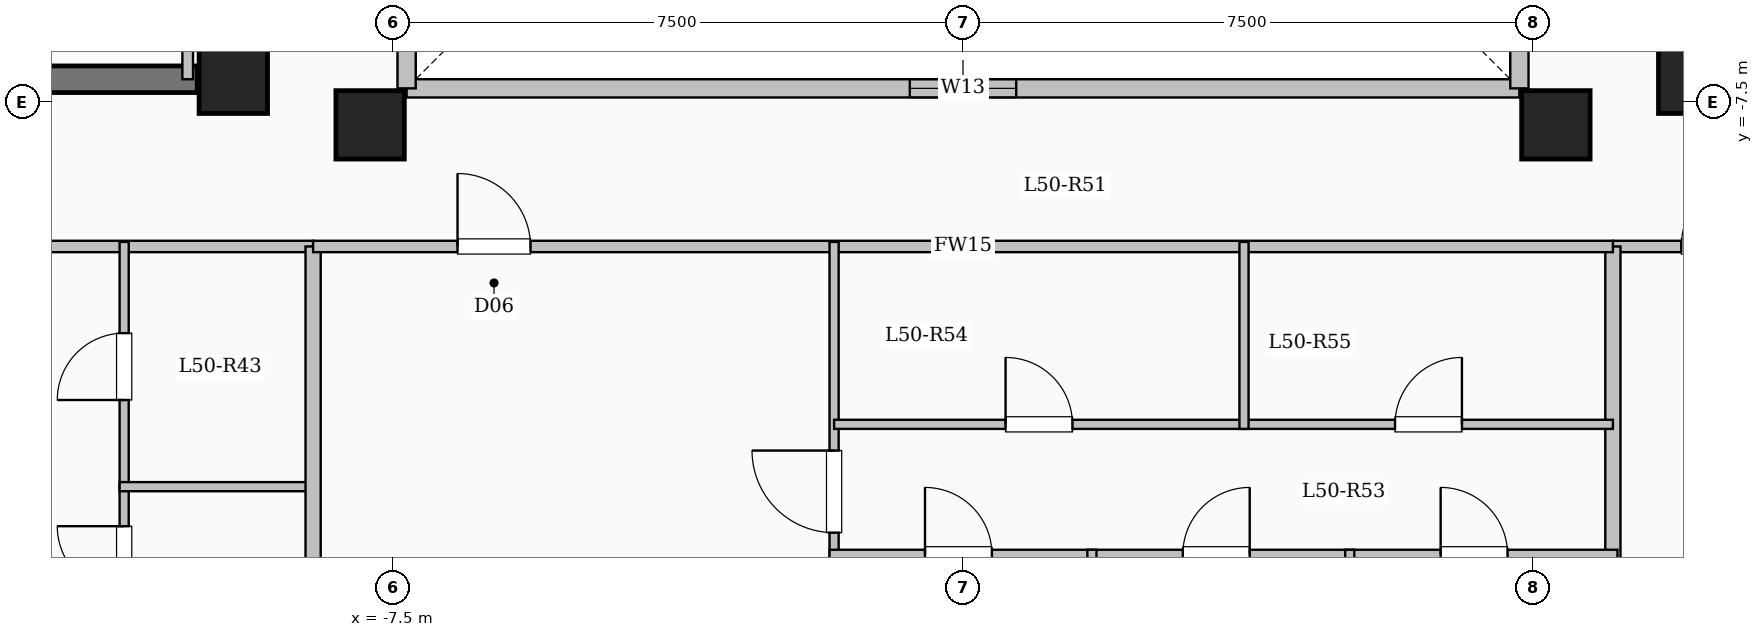
"""IFC4 building model, lengths in metres.
Left out: names, types, materials, properties, quantities, classifications, styles, units other than length and angle.
Written with IfcOpenShell. Run it as: python <this file> out.ifc"""

import sys

from ifc_helpers import new_model, si_unit, direction, frame, frame_2d, origin, origin_2d, place, context, subcontext, project, spatial, rectangle, extrude, element, fill, save


model = new_model("IFC4")
c1 = context("Model", 3, precision=1e-05, world=origin(), true_north=direction((0.0, 1.0)))
c2 = subcontext(c1, "Body", "Model", "MODEL_VIEW")
j1 = project(units=[si_unit("LENGTHUNIT", "METRE"), si_unit("PLANEANGLEUNIT", "RADIAN")], contexts=[c1])
p1 = place(None, origin())
s1 = spatial("IfcSite", under=j1, at=p1, CompositionType="ELEMENT")
p2 = place(p1, origin())
s2 = spatial("IfcBuilding", under=s1, at=p2, CompositionType="ELEMENT")
p3 = place(p2, frame((0.0, 0.0, 186.9)))
s3 = spatial("IfcBuildingStorey", under=s2, at=p3, CompositionType="ELEMENT", Elevation=186.9)
for number, where, z_axis, x_axis in (
    (1, (-7.8, -7.8, 0.0), (0.0, 0.0, 1.0), (1.0, 0.0, 0.0)),
    (2, (7.8, -7.8, 0.0), (0.0, 0.0, 1.0), (1.0, 0.0, 0.0)),
    (3, (-9.6, -7.2, 0.0), (0.0, 0.0, 1.0), (1.0, 0.0, 0.0)),
    (4, (9.6, -7.2, 0.0), (0.0, 0.0, 1.0), (1.0, 0.0, 0.0)),
):
    element("IfcColumn", number, at=place(p3, frame(where, z_axis=z_axis, x_axis=x_axis)), inside=s3, PredefinedType="COLUMN", context=c2, shape_type="SweptSolid", body=[
        extrude(rectangle(XDim=0.9, YDim=0.9, at=origin_2d()), origin(), (0.0, 0.0, 1.0), 3.35),
    ])
p4 = place(p3, frame((-7.32, -7.32, 0.0), z_axis=(0.0, 0.0, 1.0), x_axis=(1.0, 0.0, 0.0)))
e5 = element("IfcWall", 5, at=p4, inside=s3, PredefinedType="SOLIDWALL", context=c2, shape_type="SweptSolid", body=[
    extrude(rectangle(XDim=14.64, YDim=0.24, at=frame_2d((7.32, 0.0))), origin(), (0.0, 0.0, 1.0), 3.1),
])
p5 = place(p4, frame((6.62, 0.0, 0.95)))
e6 = element("IfcOpeningElement", 6, at=p5, cuts=e5, PredefinedType="OPENING", context=c2, shape_type="SweptSolid", body=[
    extrude(rectangle(XDim=1.4, YDim=1.5, at=frame_2d((0.7, 0.75))), frame((0.0, 0.13, 0.0), z_axis=(0.0, -1.0, 0.0), x_axis=(1.0, 0.0, 0.0)), (0.0, 0.0, 1.0), 0.26),
])
p6 = place(p3, frame((7.32, -7.32, 0.0), z_axis=(0.0, 0.0, 1.0), x_axis=(0.0, 1.0, 0.0)))
e7 = element("IfcWall", 7, at=p6, inside=s3, PredefinedType="SOLIDWALL", context=c2, shape_type="SweptSolid", body=[
    extrude(rectangle(XDim=14.64, YDim=0.24, at=frame_2d((7.32, 0.0))), origin(), (0.0, 0.0, 1.0), 3.1),
])
p7 = place(p6, frame((6.62, 0.0, 0.95)))
e8 = element("IfcOpeningElement", 8, at=p7, cuts=e7, PredefinedType="OPENING", context=c2, shape_type="SweptSolid", body=[
    extrude(rectangle(XDim=1.4, YDim=1.5, at=frame_2d((0.7, 0.75))), frame((0.0, 0.13, 0.0), z_axis=(0.0, -1.0, 0.0), x_axis=(1.0, 0.0, 0.0)), (0.0, 0.0, 1.0), 0.26),
])
p8 = place(p3, frame((-7.32, 7.32, 0.0), z_axis=(0.0, 0.0, 1.0), x_axis=(0.0, -1.0, 0.0)))
e9 = element("IfcWall", 9, at=p8, inside=s3, PredefinedType="SOLIDWALL", context=c2, shape_type="SweptSolid", body=[
    extrude(rectangle(XDim=14.64, YDim=0.24, at=frame_2d((7.32, 0.0))), origin(), (0.0, 0.0, 1.0), 3.1),
])
p9 = place(p8, frame((6.62, 0.0, 0.95)))
e10 = element("IfcOpeningElement", 10, at=p9, cuts=e9, PredefinedType="OPENING", context=c2, shape_type="SweptSolid", body=[
    extrude(rectangle(XDim=1.4, YDim=1.5, at=frame_2d((0.7, 0.75))), frame((0.0, 0.13, 0.0), z_axis=(0.0, -1.0, 0.0), x_axis=(1.0, 0.0, 0.0)), (0.0, 0.0, 1.0), 0.26),
])
p10 = place(p3, frame((-18.625, -7.2, 0.0), z_axis=(0.0, 0.0, 1.0), x_axis=(1.0, 0.0, 0.0)))
e11 = element("IfcWall", 11, at=p10, inside=s3, PredefinedType="SHEAR", context=c2, shape_type="SweptSolid", body=[
    extrude(rectangle(XDim=8.55, YDim=0.35, at=frame_2d((4.275, 0.0))), origin(), (0.0, 0.0, 1.0), 3.35),
])
p11 = place(p10, frame((1.725, 0.0, 0.0)))
e12 = element("IfcOpeningElement", 12, at=p11, cuts=e11, PredefinedType="OPENING", context=c2, shape_type="SweptSolid", body=[
    extrude(rectangle(XDim=1.12, YDim=2.15, at=frame_2d((0.56, 1.075))), frame((0.0, 0.185, 0.0), z_axis=(0.0, -1.0, 0.0), x_axis=(1.0, 0.0, 0.0)), (0.0, 0.0, 1.0), 0.37),
])
p12 = place(p3, frame((-10.2, -7.2, 0.0), z_axis=(0.0, 0.0, 1.0), x_axis=(0.0, 1.0, 0.0)))
e13 = element("IfcWall", 13, at=p12, inside=s3, PredefinedType="PARTITIONING", context=c2, shape_type="SweptSolid", body=[
    extrude(rectangle(XDim=9.12, YDim=0.14, at=frame_2d((4.56, 0.0))), origin(), (0.0, 0.0, 1.0), 3.1),
])
p13 = place(p12, frame((1.75, 0.0, 0.0)))
e14 = element("IfcOpeningElement", 14, at=p13, cuts=e13, PredefinedType="OPENING", context=c2, shape_type="SweptSolid", body=[
    extrude(rectangle(XDim=0.95, YDim=2.12, at=frame_2d((0.475, 1.06))), frame((0.0, 0.08, 0.0), z_axis=(0.0, -1.0, 0.0), x_axis=(1.0, 0.0, 0.0)), (0.0, 0.0, 1.0), 0.16),
])
p14 = place(p12, frame((5.8, 0.0, 0.0)))
e15 = element("IfcOpeningElement", 15, at=p14, cuts=e13, PredefinedType="OPENING", context=c2, shape_type="SweptSolid", body=[
    extrude(rectangle(XDim=0.95, YDim=2.12, at=frame_2d((0.475, 1.06))), frame((0.0, 0.08, 0.0), z_axis=(0.0, -1.0, 0.0), x_axis=(1.0, 0.0, 0.0)), (0.0, 0.0, 1.0), 0.16),
])
p15 = place(p3, frame((-18.35, -9.4, 0.0), z_axis=(0.0, 0.0, 1.0), x_axis=(1.0, 0.0, 0.0)))
e16 = element("IfcWall", 16, at=p15, inside=s3, PredefinedType="PARTITIONING", context=c2, shape_type="SweptSolid", body=[
    extrude(rectangle(XDim=9.8, YDim=0.15, at=frame_2d((4.9, 0.0))), origin(), (0.0, 0.0, 1.0), 3.1),
])
p16 = place(p15, frame((0.7, 0.0, 0.0)))
e17 = element("IfcOpeningElement", 17, at=p16, cuts=e16, PredefinedType="OPENING", context=c2, shape_type="SweptSolid", body=[
    extrude(rectangle(XDim=0.96, YDim=2.15, at=frame_2d((0.48, 1.075))), frame((0.0, 0.085, 0.0), z_axis=(0.0, -1.0, 0.0), x_axis=(1.0, 0.0, 0.0)), (0.0, 0.0, 1.0), 0.17),
])
p17 = place(p15, frame((5.38, 0.0, 0.0)))
e18 = element("IfcOpeningElement", 18, at=p17, cuts=e16, PredefinedType="OPENING", context=c2, shape_type="SweptSolid", body=[
    extrude(rectangle(XDim=0.96, YDim=2.15, at=frame_2d((0.48, 1.075))), frame((0.0, 0.085, 0.0), z_axis=(0.0, -1.0, 0.0), x_axis=(1.0, 0.0, 0.0)), (0.0, 0.0, 1.0), 0.17),
])
p18 = place(p3, frame((8.55, -9.4, 0.0), z_axis=(0.0, 0.0, 1.0), x_axis=(1.0, 0.0, 0.0)))
e19 = element("IfcWall", 19, at=p18, inside=s3, PredefinedType="PARTITIONING", context=c2, shape_type="SweptSolid", body=[
    extrude(rectangle(XDim=9.8, YDim=0.15, at=frame_2d((4.9, 0.0))), origin(), (0.0, 0.0, 1.0), 3.1),
])
p19 = place(p18, frame((0.9, 0.0, 0.0)))
e20 = element("IfcOpeningElement", 20, at=p19, cuts=e19, PredefinedType="OPENING", context=c2, shape_type="SweptSolid", body=[
    extrude(rectangle(XDim=0.96, YDim=2.15, at=frame_2d((0.48, 1.075))), frame((0.0, 0.085, 0.0), z_axis=(0.0, -1.0, 0.0), x_axis=(1.0, 0.0, 0.0)), (0.0, 0.0, 1.0), 0.17),
])
p20 = place(p3, frame((-11.036, -20.9, 0.0), z_axis=(0.0, 0.0, 1.0), x_axis=(0.0, 1.0, 0.0)))
e21 = element("IfcWall", 21, at=p20, inside=s3, PredefinedType="PARTITIONING", context=c2, shape_type="SweptSolid", body=[
    extrude(rectangle(XDim=8.34, YDim=0.12, at=frame_2d((4.17, 0.0))), origin(), (0.0, 0.0, 1.0), 3.1),
])
p21 = place(p20, frame((6.94, 0.0, 0.0)))
e22 = element("IfcOpeningElement", 22, at=p21, cuts=e21, PredefinedType="OPENING", context=c2, shape_type="SweptSolid", body=[
    extrude(rectangle(XDim=0.88, YDim=2.1, at=frame_2d((0.44, 1.05))), frame((0.0, 0.07, 0.0), z_axis=(0.0, -1.0, 0.0), x_axis=(1.0, 0.0, 0.0)), (0.0, 0.0, 1.0), 0.14),
])
p22 = place(p3, frame((-11.036, -12.56, 0.0), z_axis=(0.0, 0.0, 1.0), x_axis=(0.0, 1.0, 0.0)))
e23 = element("IfcWall", 23, at=p22, inside=s3, PredefinedType="PARTITIONING", context=c2, shape_type="SweptSolid", body=[
    extrude(rectangle(XDim=3.22, YDim=0.12, at=frame_2d((1.61, 0.0))), origin(), (0.0, 0.0, 1.0), 3.1),
])
p23 = place(p22, frame((1.14, 0.0, 0.0)))
e24 = element("IfcOpeningElement", 24, at=p23, cuts=e23, PredefinedType="OPENING", context=c2, shape_type="SweptSolid", body=[
    extrude(rectangle(XDim=0.88, YDim=2.1, at=frame_2d((0.44, 1.05))), frame((0.0, 0.07, 0.0), z_axis=(0.0, -1.0, 0.0), x_axis=(1.0, 0.0, 0.0)), (0.0, 0.0, 1.0), 0.14),
])
p24 = place(p3, frame((-11.096, -12.56, 0.0), z_axis=(0.0, 0.0, 1.0), x_axis=(1.0, 0.0, 0.0)))
e25 = element("IfcWall", 25, at=p24, inside=s3, PredefinedType="PARTITIONING", context=c2, shape_type="SweptSolid", body=[
    extrude(rectangle(XDim=2.556, YDim=0.12, at=frame_2d((1.278, 0.0))), origin(), (0.0, 0.0, 1.0), 2.725),
])
for number, where, z_axis, x_axis in (
    (26, (-8.55, -21.504, 0.0), (0.0, 0.0, 1.0), (0.0, 1.0, 0.0)),
    (27, (8.55, -21.504, 0.0), (0.0, 0.0, 1.0), (0.0, 1.0, 0.0)),
):
    element("IfcWall", number, at=place(p3, frame(where, z_axis=z_axis, x_axis=x_axis)), inside=s3, PredefinedType="SOLIDWALL", context=c2, shape_type="SweptSolid", body=[
        extrude(rectangle(XDim=12.104, YDim=0.2, at=frame_2d((6.052, 0.0))), origin(), (0.0, 0.0, 1.0), 3.1),
    ])
p25 = place(p3, frame((-8.55, -9.4, 0.0), z_axis=(0.0, 0.0, 1.0), x_axis=(1.0, 0.0, 0.0)))
e28 = element("IfcWall", 28, at=p25, inside=s3, PredefinedType="PARTITIONING", context=c2, shape_type="SweptSolid", body=[
    extrude(rectangle(XDim=17.1, YDim=0.15, at=frame_2d((8.55, 0.0))), origin(), (0.0, 0.0, 1.0), 3.1),
])
p26 = place(p25, frame((1.9, 0.0, 0.0)))
e29 = element("IfcOpeningElement", 29, at=p26, cuts=e28, PredefinedType="OPENING", context=c2, shape_type="SweptSolid", body=[
    extrude(rectangle(XDim=0.96, YDim=2.15, at=frame_2d((0.48, 1.075))), frame((0.0, 0.085, 0.0), z_axis=(0.0, -1.0, 0.0), x_axis=(1.0, 0.0, 0.0)), (0.0, 0.0, 1.0), 0.17),
])
p27 = place(p3, frame((-1.696, -22.38, 0.0), z_axis=(0.0, 0.0, 1.0), x_axis=(0.0, 1.0, 0.0)))
e30 = element("IfcWall", 30, at=p27, inside=s3, PredefinedType="PARTITIONING", context=c2, shape_type="SweptSolid", body=[
    extrude(rectangle(XDim=13.04, YDim=0.12, at=frame_2d((6.52, 0.0))), origin(), (0.0, 0.0, 1.0), 3.1),
])
p28 = place(p27, frame((9.215, 0.0, 0.0)))
e31 = element("IfcOpeningElement", 31, at=p28, cuts=e30, PredefinedType="OPENING", context=c2, shape_type="SweptSolid", body=[
    extrude(rectangle(XDim=1.08, YDim=2.15, at=frame_2d((0.54, 1.075))), frame((0.0, 0.07, 0.0), z_axis=(0.0, -1.0, 0.0), x_axis=(1.0, 0.0, 0.0)), (0.0, 0.0, 1.0), 0.14),
])
p29 = place(p3, frame((-1.696, -11.74, 0.0), z_axis=(0.0, 0.0, 1.0), x_axis=(1.0, 0.0, 0.0)))
e32 = element("IfcWall", 32, at=p29, inside=s3, PredefinedType="PARTITIONING", context=c2, shape_type="SweptSolid", body=[
    extrude(rectangle(XDim=5.393, YDim=0.12, at=frame_2d((2.697, 0.0))), origin(), (0.0, 0.0, 1.0), 3.1),
])
p30 = place(p29, frame((2.256, 0.0, 0.0)))
e33 = element("IfcOpeningElement", 33, at=p30, cuts=e32, PredefinedType="OPENING", context=c2, shape_type="SweptSolid", body=[
    extrude(rectangle(XDim=0.88, YDim=2.1, at=frame_2d((0.44, 1.05))), frame((0.0, 0.07, 0.0), z_axis=(0.0, -1.0, 0.0), x_axis=(1.0, 0.0, 0.0)), (0.0, 0.0, 1.0), 0.14),
])
p31 = place(p3, frame((3.697, -11.74, 0.0), z_axis=(0.0, 0.0, 1.0), x_axis=(1.0, 0.0, 0.0)))
e34 = element("IfcWall", 34, at=p31, inside=s3, PredefinedType="PARTITIONING", context=c2, shape_type="SweptSolid", body=[
    extrude(rectangle(XDim=4.853, YDim=0.12, at=frame_2d((2.427, 0.0))), origin(), (0.0, 0.0, 1.0), 3.1),
])
p32 = place(p31, frame((1.987, 0.0, 0.0)))
e35 = element("IfcOpeningElement", 35, at=p32, cuts=e34, PredefinedType="OPENING", context=c2, shape_type="SweptSolid", body=[
    extrude(rectangle(XDim=0.88, YDim=2.1, at=frame_2d((0.44, 1.05))), frame((0.0, 0.07, 0.0), z_axis=(0.0, -1.0, 0.0), x_axis=(1.0, 0.0, 0.0)), (0.0, 0.0, 1.0), 0.14),
])
p33 = place(p3, frame((-1.756, -13.45, 0.0), z_axis=(0.0, 0.0, 1.0), x_axis=(1.0, 0.0, 0.0)))
e36 = element("IfcWall", 36, at=p33, inside=s3, PredefinedType="PARTITIONING", context=c2, shape_type="SweptSolid", body=[
    extrude(rectangle(XDim=10.366, YDim=0.12, at=frame_2d((5.183, 0.0))), origin(), (0.0, 0.0, 1.0), 3.1),
])
p34 = place(p33, frame((1.256, 0.0, 0.0)))
e37 = element("IfcOpeningElement", 37, at=p34, cuts=e36, PredefinedType="OPENING", context=c2, shape_type="SweptSolid", body=[
    extrude(rectangle(XDim=0.88, YDim=2.1, at=frame_2d((0.44, 1.05))), frame((0.0, 0.07, 0.0), z_axis=(0.0, -1.0, 0.0), x_axis=(1.0, 0.0, 0.0)), (0.0, 0.0, 1.0), 0.14),
])
p35 = place(p33, frame((4.648, 0.0, 0.0)))
e38 = element("IfcOpeningElement", 38, at=p35, cuts=e36, PredefinedType="OPENING", context=c2, shape_type="SweptSolid", body=[
    extrude(rectangle(XDim=0.88, YDim=2.1, at=frame_2d((0.44, 1.05))), frame((0.0, 0.07, 0.0), z_axis=(0.0, -1.0, 0.0), x_axis=(1.0, 0.0, 0.0)), (0.0, 0.0, 1.0), 0.14),
])
p36 = place(p33, frame((8.04, 0.0, 0.0)))
e39 = element("IfcOpeningElement", 39, at=p36, cuts=e36, PredefinedType="OPENING", context=c2, shape_type="SweptSolid", body=[
    extrude(rectangle(XDim=0.88, YDim=2.1, at=frame_2d((0.44, 1.05))), frame((0.0, 0.07, 0.0), z_axis=(0.0, -1.0, 0.0), x_axis=(1.0, 0.0, 0.0)), (0.0, 0.0, 1.0), 0.14),
])
p37 = place(p3, frame((3.697, -11.8, 0.0), z_axis=(0.0, 0.0, 1.0), x_axis=(0.0, 1.0, 0.0)))
e40 = element("IfcWall", 40, at=p37, inside=s3, PredefinedType="PARTITIONING", context=c2, shape_type="SweptSolid", body=[
    extrude(rectangle(XDim=2.46, YDim=0.12, at=frame_2d((1.23, 0.0))), origin(), (0.0, 0.0, 1.0), 3.1),
])
p38 = place(p3, frame((1.696, -22.38, 0.0), z_axis=(0.0, 0.0, 1.0), x_axis=(0.0, 1.0, 0.0)))
e41 = element("IfcWall", 41, at=p38, inside=s3, PredefinedType="PARTITIONING", context=c2, shape_type="SweptSolid", body=[
    extrude(rectangle(XDim=8.99, YDim=0.12, at=frame_2d((4.495, 0.0))), origin(), (0.0, 0.0, 1.0), 3.1),
])
p39 = place(p3, frame((5.088, -22.358, 0.0), z_axis=(0.0, 0.0, 1.0), x_axis=(0.0, 1.0, 0.0)))
e42 = element("IfcWall", 42, at=p39, inside=s3, PredefinedType="PARTITIONING", context=c2, shape_type="SweptSolid", body=[
    extrude(rectangle(XDim=8.968, YDim=0.12, at=frame_2d((4.484, 0.0))), origin(), (0.0, 0.0, 1.0), 3.1),
])
p40 = place(p5, origin())
e43 = element("IfcWindow", 43, at=p40, inside=s3, PartitioningType="SINGLE_PANEL", PredefinedType="WINDOW", context=c2, shape_type="SweptSolid", body=[
    extrude(rectangle(XDim=1.4, YDim=1.5, at=frame_2d((0.7, 0.75))), frame((0.0, 0.03, 0.0), z_axis=(0.0, -1.0, 0.0), x_axis=(1.0, 0.0, 0.0)), (0.0, 0.0, 1.0), 0.06),
])
fill(e6, e43)
p41 = place(p21, origin())
e44 = element("IfcDoor", 44, at=p41, inside=s3, OperationType="SINGLE_SWING_RIGHT", PredefinedType="DOOR", context=c2, shape_type="SweptSolid", body=[
    extrude(rectangle(XDim=0.88, YDim=2.1, at=frame_2d((0.44, 1.05))), frame((0.0, 0.025, 0.0), z_axis=(0.0, -1.0, 0.0), x_axis=(1.0, 0.0, 0.0)), (0.0, 0.0, 1.0), 0.05),
])
fill(e22, e44)
p42 = place(p23, origin())
e45 = element("IfcDoor", 45, at=p42, inside=s3, OperationType="SINGLE_SWING_LEFT", PredefinedType="DOOR", context=c2, shape_type="SweptSolid", body=[
    extrude(rectangle(XDim=0.88, YDim=2.1, at=frame_2d((0.44, 1.05))), frame((0.0, 0.025, 0.0), z_axis=(0.0, -1.0, 0.0), x_axis=(1.0, 0.0, 0.0)), (0.0, 0.0, 1.0), 0.05),
])
fill(e24, e45)
p43 = place(p19, origin())
e46 = element("IfcDoor", 46, at=p43, inside=s3, OperationType="SINGLE_SWING_RIGHT", PredefinedType="DOOR", context=c2, shape_type="SweptSolid", body=[
    extrude(rectangle(XDim=0.96, YDim=2.15, at=frame_2d((0.48, 1.075))), frame((0.0, 0.025, 0.0), z_axis=(0.0, -1.0, 0.0), x_axis=(1.0, 0.0, 0.0)), (0.0, 0.0, 1.0), 0.05),
])
fill(e20, e46)
p44 = place(p26, origin())
e47 = element("IfcDoor", 47, at=p44, inside=s3, OperationType="SINGLE_SWING_LEFT", PredefinedType="DOOR", context=c2, shape_type="SweptSolid", body=[
    extrude(rectangle(XDim=0.96, YDim=2.15, at=frame_2d((0.48, 1.075))), frame((0.0, 0.025, 0.0), z_axis=(0.0, -1.0, 0.0), x_axis=(1.0, 0.0, 0.0)), (0.0, 0.0, 1.0), 0.05),
])
fill(e29, e47)
p45 = place(p28, origin())
e48 = element("IfcDoor", 48, at=p45, inside=s3, OperationType="SINGLE_SWING_RIGHT", PredefinedType="DOOR", context=c2, shape_type="SweptSolid", body=[
    extrude(rectangle(XDim=1.08, YDim=2.15, at=frame_2d((0.54, 1.075))), frame((0.0, 0.025, 0.0), z_axis=(0.0, -1.0, 0.0), x_axis=(1.0, 0.0, 0.0)), (0.0, 0.0, 1.0), 0.05),
])
fill(e31, e48)
p46 = place(p30, origin())
e49 = element("IfcDoor", 49, at=p46, inside=s3, OperationType="SINGLE_SWING_LEFT", PredefinedType="DOOR", context=c2, shape_type="SweptSolid", body=[
    extrude(rectangle(XDim=0.88, YDim=2.1, at=frame_2d((0.44, 1.05))), frame((0.0, 0.025, 0.0), z_axis=(0.0, -1.0, 0.0), x_axis=(1.0, 0.0, 0.0)), (0.0, 0.0, 1.0), 0.05),
])
fill(e33, e49)
p47 = place(p32, origin())
e50 = element("IfcDoor", 50, at=p47, inside=s3, OperationType="SINGLE_SWING_RIGHT", PredefinedType="DOOR", context=c2, shape_type="SweptSolid", body=[
    extrude(rectangle(XDim=0.88, YDim=2.1, at=frame_2d((0.44, 1.05))), frame((0.0, 0.025, 0.0), z_axis=(0.0, -1.0, 0.0), x_axis=(1.0, 0.0, 0.0)), (0.0, 0.0, 1.0), 0.05),
])
fill(e35, e50)
p48 = place(p34, origin())
e51 = element("IfcDoor", 51, at=p48, inside=s3, OperationType="SINGLE_SWING_LEFT", PredefinedType="DOOR", context=c2, shape_type="SweptSolid", body=[
    extrude(rectangle(XDim=0.88, YDim=2.1, at=frame_2d((0.44, 1.05))), frame((0.0, 0.025, 0.0), z_axis=(0.0, -1.0, 0.0), x_axis=(1.0, 0.0, 0.0)), (0.0, 0.0, 1.0), 0.05),
])
fill(e37, e51)
p49 = place(p35, origin())
e52 = element("IfcDoor", 52, at=p49, inside=s3, OperationType="SINGLE_SWING_RIGHT", PredefinedType="DOOR", context=c2, shape_type="SweptSolid", body=[
    extrude(rectangle(XDim=0.88, YDim=2.1, at=frame_2d((0.44, 1.05))), frame((0.0, 0.025, 0.0), z_axis=(0.0, -1.0, 0.0), x_axis=(1.0, 0.0, 0.0)), (0.0, 0.0, 1.0), 0.05),
])
fill(e38, e52)
p50 = place(p36, origin())
e53 = element("IfcDoor", 53, at=p50, inside=s3, OperationType="SINGLE_SWING_LEFT", PredefinedType="DOOR", context=c2, shape_type="SweptSolid", body=[
    extrude(rectangle(XDim=0.88, YDim=2.1, at=frame_2d((0.44, 1.05))), frame((0.0, 0.025, 0.0), z_axis=(0.0, -1.0, 0.0), x_axis=(1.0, 0.0, 0.0)), (0.0, 0.0, 1.0), 0.05),
])
fill(e39, e53)
save(model, sys.argv[1])
